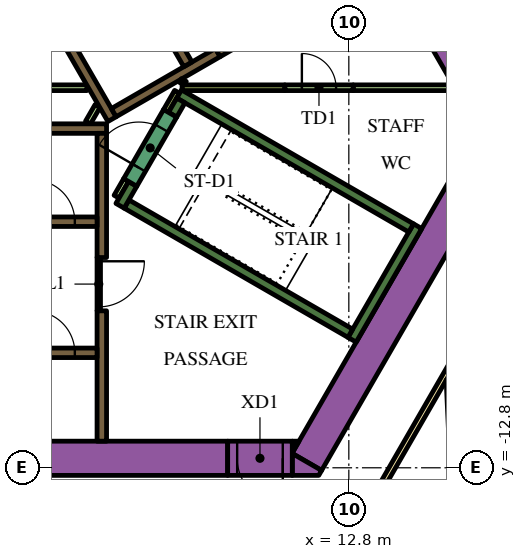
"""IFC4 building model, lengths in metres.
Left out: names, types, materials, properties, quantities, classifications, styles, units other than length and angle.
Written with IfcOpenShell. Run it as: python <this file> out.ifc"""

import sys

from ifc_helpers import new_model, si_unit, direction, frame, frame_2d, origin, place, context, subcontext, project, spatial, polyline, rectangle, outline, extrude, element, fill, save


model = new_model("IFC4")
c1 = context("Model", 3, precision=1e-05, world=origin(), true_north=direction((0.0, 1.0)))
c2 = subcontext(c1, "Body", "Model", "MODEL_VIEW")
j1 = project(units=[si_unit("LENGTHUNIT", "METRE"), si_unit("PLANEANGLEUNIT", "RADIAN")], contexts=[c1])
p1 = place(None, origin())
s1 = spatial("IfcSite", under=j1, at=p1, CompositionType="ELEMENT")
p2 = place(p1, origin())
s2 = spatial("IfcBuilding", under=s1, at=p2, CompositionType="ELEMENT")
p3 = place(p2, frame((0.0, 0.0, 54.9)))
s3 = spatial("IfcBuildingStorey", under=s2, at=p3, CompositionType="ELEMENT", Elevation=54.9)
p4 = place(p3, frame((6.776, 13.364, 0.0), z_axis=(0.0, 0.0, 1.0), x_axis=(0.500004177138, -0.8660229921, 0.0)))
e1 = element("IfcWall", 1, at=p4, inside=s3, PredefinedType="SOLIDWALL", context=c2, shape_type="SweptSolid", body=[
    extrude(rectangle(XDim=20.204, YDim=0.9, at=frame_2d((10.102, 0.0))), origin(), (0.0, 0.0, 1.0), 3.9),
])
p5 = place(p3, frame((11.695, -12.644, 0.0), z_axis=(0.0, 0.0, 1.0), x_axis=(0.500010229568, 0.86601949766, 0.0)))
e2 = element("IfcWall", 2, at=p5, inside=s3, PredefinedType="SOLIDWALL", context=c2, shape_type="SweptSolid", body=[
    extrude(rectangle(XDim=9.326, YDim=0.9, at=frame_2d((4.663, 0.0))), origin(), (0.0, 0.0, 1.0), 3.9),
])
p6 = place(p3, origin())
e3 = element("IfcWall", 3, at=p6, inside=s3, PredefinedType="SOLIDWALL", context=c2, shape_type="SweptSolid", body=[
    extrude(outline(polyline([(12.009, -13.0), (11.312, -13.0), (11.312, -12.425), (12.083, -12.871), (12.009, -13.0)])), origin(), (0.0, 0.0, 1.0), 3.9),
])
e4 = element("IfcWall", 4, at=p6, inside=s3, PredefinedType="SOLIDWALL", context=c2, shape_type="SweptSolid", body=[
    extrude(outline(polyline([(11.489, -12.1), (11.312, -12.407), (11.312, -12.1), (11.489, -12.1)])), origin(), (0.0, 0.0, 1.0), 3.9),
])
p7 = place(p3, frame((-12.019, -12.55, 0.0), z_axis=(0.0, 0.0, 1.0), x_axis=(1.0, 0.0, 0.0)))
e5 = element("IfcWall", 5, at=p7, inside=s3, PredefinedType="SOLIDWALL", context=c2, shape_type="SweptSolid", body=[
    extrude(rectangle(XDim=21.63, YDim=0.9, at=frame_2d((10.815, 0.0))), origin(), (0.0, 0.0, 1.0), 3.9),
])
p8 = place(p3, frame((12.885, -9.431, 0.0), z_axis=(0.0, 0.0, 1.0), x_axis=(0.500020560727, 0.866013532718, 0.0)))
e6 = element("IfcWall", 6, at=p8, inside=s3, PredefinedType="SOLIDWALL", context=c2, shape_type="SweptSolid", body=[
    extrude(rectangle(XDim=3.45, YDim=0.25, at=frame_2d((1.725, 0.0))), origin(), (0.0, 0.0, 1.0), 3.9),
])
p9 = place(p3, frame((12.84, -9.261, 0.0), z_axis=(0.0, 0.0, 1.0), x_axis=(-0.866013990052, 0.500019768644, 0.0)))
e7 = element("IfcWall", 7, at=p9, inside=s3, PredefinedType="SOLIDWALL", context=c2, shape_type="SweptSolid", body=[
    extrude(rectangle(XDim=6.8, YDim=0.25, at=frame_2d((3.4, 0.0))), origin(), (0.0, 0.0, 1.0), 3.9),
])
p10 = place(p3, frame((7.113, -5.33, 0.0), z_axis=(0.0, 0.0, 1.0), x_axis=(-0.499965889992, -0.866045096311, 0.0)))
e8 = element("IfcWall", 8, at=p10, inside=s3, PredefinedType="SOLIDWALL", context=c2, shape_type="SweptSolid", body=[
    extrude(rectangle(XDim=0.666, YDim=0.25, at=frame_2d((0.333, 0.0))), origin(), (0.0, 0.0, 1.0), 3.9),
])
p11 = place(p3, frame((8.334, -2.964, 0.0), z_axis=(0.0, 0.0, 1.0), x_axis=(0.866016039709, -0.500016218704, 0.0)))
e9 = element("IfcWall", 9, at=p11, inside=s3, PredefinedType="SOLIDWALL", context=c2, shape_type="SweptSolid", body=[
    extrude(rectangle(XDim=7.05, YDim=0.25, at=frame_2d((3.525, 0.0))), origin(), (0.0, 0.0, 1.0), 3.9),
])
p12 = place(p3, frame((8.163, -3.511, 0.0), z_axis=(0.0, 0.0, 1.0), x_axis=(0.500127794843, 0.865951608824, 0.0)))
e10 = element("IfcWall", 10, at=p12, inside=s3, PredefinedType="SOLIDWALL", context=c2, shape_type="SweptSolid", body=[
    extrude(rectangle(XDim=0.435, YDim=0.25, at=frame_2d((0.217, 0.0))), origin(), (0.0, 0.0, 1.0), 3.9),
])
p13 = place(p3, frame((-6.19, -3.875, 0.0), z_axis=(0.0, 0.0, 1.0), x_axis=(1.0, 0.0, 0.0)))
e11 = element("IfcWall", 11, at=p13, inside=s3, PredefinedType="SOLIDWALL", context=c2, shape_type="SweptSolid", body=[
    extrude(rectangle(XDim=12.615, YDim=0.25, at=frame_2d((6.307, 0.0))), origin(), (0.0, 0.0, 1.0), 3.9),
])
p14 = place(p3, frame((6.3, -8.67, 0.0), z_axis=(0.0, 0.0, 1.0), x_axis=(0.0, -1.0, 0.0)))
e12 = element("IfcWall", 12, at=p14, inside=s3, PredefinedType="SOLIDWALL", context=c2, shape_type="SweptSolid", body=[
    extrude(rectangle(XDim=3.43, YDim=0.25, at=frame_2d((1.715, 0.0))), origin(), (0.0, 0.0, 1.0), 3.9),
])
p15 = place(p3, frame((6.3, -7.268, 0.0), z_axis=(0.0, 0.0, 1.0), x_axis=(0.0, 1.0, 0.0)))
e13 = element("IfcWall", 13, at=p15, inside=s3, PredefinedType="SOLIDWALL", context=c2, shape_type="SweptSolid", body=[
    extrude(rectangle(XDim=3.268, YDim=0.25, at=frame_2d((1.634, 0.0))), origin(), (0.0, 0.0, 1.0), 3.9),
])
e14 = element("IfcWall", 14, at=p6, inside=s3, PredefinedType="SOLIDWALL", context=c2, shape_type="SweptSolid", body=[
    extrude(outline(polyline([(0.335, 6.925), (0.335, 6.925), (0.335, 7.075), (0.335, 7.075), (0.335, 7.075), (0.245, 7.075), (0.079, 7.363), (0.035, 7.439), (0.252, 7.564), (0.377, 7.348), (6.552, -3.348), (6.677, -3.564), (6.46, -3.689), (4.897, -0.981), (0.332, 6.925), (0.335, 6.925), (0.335, 6.925)])), origin(), (0.0, 0.0, 1.0), 3.9),
])
p16 = place(p3, frame((9.352, -1.875, 0.0), z_axis=(0.0, 0.0, 1.0), x_axis=(-0.866024844342, -0.500000968981, 0.0)))
e15 = element("IfcWall", 15, at=p16, inside=s3, PredefinedType="SOLIDWALL", context=c2, shape_type="SweptSolid", body=[
    extrude(rectangle(XDim=3.162, YDim=0.25, at=frame_2d((1.581, 0.0))), origin(), (0.0, 0.0, 1.0), 3.9),
])
p17 = place(p3, frame((6.688, -5.667, 0.0), z_axis=(0.0, 0.0, 1.0), x_axis=(0.499834152157, 0.86612113491, 0.0)))
e16 = element("IfcWall", 16, at=p17, inside=s3, PredefinedType="PARTITIONING", context=c2, shape_type="SweptSolid", body=[
    extrude(rectangle(XDim=0.505, YDim=0.15, at=frame_2d((0.252, 0.0))), origin(), (0.0, 0.0, 1.0), 2.75),
])
p18 = place(p3, frame((5.936, -3.718, 0.0), z_axis=(0.0, 0.0, 1.0), x_axis=(0.499890179513, 0.866088799389, 0.0)))
e17 = element("IfcWall", 17, at=p18, inside=s3, PredefinedType="PARTITIONING", context=c2, shape_type="SweptSolid", body=[
    extrude(rectangle(XDim=0.504, YDim=0.15, at=frame_2d((0.252, 0.0))), origin(), (0.0, 0.0, 1.0), 2.75),
])
p19 = place(p3, frame((8.412, -2.8, 0.0), z_axis=(0.0, 0.0, 1.0), x_axis=(1.0, 0.0, 0.0)))
e18 = element("IfcWall", 18, at=p19, inside=s3, PredefinedType="PARTITIONING", context=c2, shape_type="SweptSolid", body=[
    extrude(rectangle(XDim=2.702, YDim=0.15, at=frame_2d((1.351, 0.0))), origin(), (0.0, 0.0, 1.0), 3.9),
])
p20 = place(p3, frame((8.459, -2.599, 0.0), z_axis=(0.0, 0.0, 1.0), x_axis=(-0.501919277433, -0.864914469148, 0.0)))
e19 = element("IfcWall", 19, at=p20, inside=s3, PredefinedType="PARTITIONING", context=c2, shape_type="SweptSolid", body=[
    extrude(rectangle(XDim=0.109, YDim=0.15, at=frame_2d((0.054, 0.0))), origin(), (0.0, 0.0, 1.0), 3.9),
])
p21 = place(p3, frame((8.281, -2.907, 0.0), z_axis=(0.0, 0.0, 1.0), x_axis=(-0.500193841991, -0.86591346013, 0.0)))
e20 = element("IfcWall", 20, at=p21, inside=s3, PredefinedType="PARTITIONING", context=c2, shape_type="SweptSolid", body=[
    extrude(rectangle(XDim=0.583, YDim=0.15, at=frame_2d((0.292, 0.0))), origin(), (0.0, 0.0, 1.0), 3.9),
])
p22 = place(p3, frame((3.238, -2.8, 0.0), z_axis=(0.0, 0.0, 1.0), x_axis=(1.0, 0.0, 0.0)))
e21 = element("IfcWall", 21, at=p22, inside=s3, PredefinedType="PARTITIONING", context=c2, shape_type="SweptSolid", body=[
    extrude(rectangle(XDim=2.672, YDim=0.15, at=frame_2d((1.336, 0.0))), origin(), (0.0, 0.0, 1.0), 2.75),
])
p23 = place(p3, frame((12.915, -2.8, 0.0), z_axis=(0.0, 0.0, 1.0), x_axis=(1.0, 0.0, 0.0)))
e22 = element("IfcWall", 22, at=p23, inside=s3, PredefinedType="PARTITIONING", context=c2, shape_type="SweptSolid", body=[
    extrude(rectangle(XDim=2.637, YDim=0.15, at=frame_2d((1.318, 0.0))), origin(), (0.0, 0.0, 1.0), 2.75),
])
p24 = place(p3, frame((-6.175, -9.775, 0.0), z_axis=(0.0, 0.0, 1.0), x_axis=(1.0, 0.0, 0.0)))
e23 = element("IfcWall", 23, at=p24, inside=s3, PredefinedType="SOLIDWALL", context=c2, shape_type="SweptSolid", body=[
    extrude(rectangle(XDim=12.35, YDim=0.25, at=frame_2d((6.175, 0.0))), origin(), (0.0, 0.0, 1.0), 3.9),
])
p25 = place(p24, frame((0.585, 0.0, 0.0)))
e24 = element("IfcOpeningElement", 24, at=p25, cuts=e23, PredefinedType="OPENING", context=c2, shape_type="SweptSolid", body=[
    extrude(rectangle(XDim=1.1, YDim=2.1, at=frame_2d((0.55, 1.05))), frame((0.0, 0.135, 0.0), z_axis=(0.0, -1.0, 0.0), x_axis=(1.0, 0.0, 0.0)), (0.0, 0.0, 1.0), 0.27),
])
p26 = place(p24, frame((3.105, 0.0, 0.0)))
e25 = element("IfcOpeningElement", 25, at=p26, cuts=e23, PredefinedType="OPENING", context=c2, shape_type="SweptSolid", body=[
    extrude(rectangle(XDim=1.1, YDim=2.1, at=frame_2d((0.55, 1.05))), frame((0.0, 0.135, 0.0), z_axis=(0.0, -1.0, 0.0), x_axis=(1.0, 0.0, 0.0)), (0.0, 0.0, 1.0), 0.27),
])
p27 = place(p24, frame((5.625, 0.0, 0.0)))
e26 = element("IfcOpeningElement", 26, at=p27, cuts=e23, PredefinedType="OPENING", context=c2, shape_type="SweptSolid", body=[
    extrude(rectangle(XDim=1.1, YDim=2.1, at=frame_2d((0.55, 1.05))), frame((0.0, 0.135, 0.0), z_axis=(0.0, -1.0, 0.0), x_axis=(1.0, 0.0, 0.0)), (0.0, 0.0, 1.0), 0.27),
])
p28 = place(p24, frame((8.145, 0.0, 0.0)))
e27 = element("IfcOpeningElement", 27, at=p28, cuts=e23, PredefinedType="OPENING", context=c2, shape_type="SweptSolid", body=[
    extrude(rectangle(XDim=1.1, YDim=2.1, at=frame_2d((0.55, 1.05))), frame((0.0, 0.135, 0.0), z_axis=(0.0, -1.0, 0.0), x_axis=(1.0, 0.0, 0.0)), (0.0, 0.0, 1.0), 0.27),
])
p29 = place(p24, frame((10.665, 0.0, 0.0)))
e28 = element("IfcOpeningElement", 28, at=p29, cuts=e23, PredefinedType="OPENING", context=c2, shape_type="SweptSolid", body=[
    extrude(rectangle(XDim=1.1, YDim=2.1, at=frame_2d((0.55, 1.05))), frame((0.0, 0.135, 0.0), z_axis=(0.0, -1.0, 0.0), x_axis=(1.0, 0.0, 0.0)), (0.0, 0.0, 1.0), 0.27),
])
p30 = place(p3, frame((-6.175, -6.325, 0.0), z_axis=(0.0, 0.0, 1.0), x_axis=(1.0, 0.0, 0.0)))
e29 = element("IfcWall", 29, at=p30, inside=s3, PredefinedType="SOLIDWALL", context=c2, shape_type="SweptSolid", body=[
    extrude(rectangle(XDim=12.35, YDim=0.25, at=frame_2d((6.175, 0.0))), origin(), (0.0, 0.0, 1.0), 3.9),
])
p31 = place(p30, frame((3.205, 0.0, 0.0)))
e30 = element("IfcOpeningElement", 30, at=p31, cuts=e29, PredefinedType="OPENING", context=c2, shape_type="SweptSolid", body=[
    extrude(rectangle(XDim=0.9, YDim=2.1, at=frame_2d((0.45, 1.05))), frame((0.0, 0.135, 0.0), z_axis=(0.0, -1.0, 0.0), x_axis=(1.0, 0.0, 0.0)), (0.0, 0.0, 1.0), 0.27),
])
p32 = place(p30, frame((8.145, 0.0, 0.0)))
e31 = element("IfcOpeningElement", 31, at=p32, cuts=e29, PredefinedType="OPENING", context=c2, shape_type="SweptSolid", body=[
    extrude(rectangle(XDim=1.1, YDim=2.1, at=frame_2d((0.55, 1.05))), frame((0.0, 0.135, 0.0), z_axis=(0.0, -1.0, 0.0), x_axis=(1.0, 0.0, 0.0)), (0.0, 0.0, 1.0), 0.27),
])
p33 = place(p30, frame((10.665, 0.0, 0.0)))
e32 = element("IfcOpeningElement", 32, at=p33, cuts=e29, PredefinedType="OPENING", context=c2, shape_type="SweptSolid", body=[
    extrude(rectangle(XDim=1.1, YDim=2.1, at=frame_2d((0.55, 1.05))), frame((0.0, 0.135, 0.0), z_axis=(0.0, -1.0, 0.0), x_axis=(1.0, 0.0, 0.0)), (0.0, 0.0, 1.0), 0.27),
])
p34 = place(p3, frame((8.565, -2.185, 0.0), z_axis=(0.0, 0.0, 1.0), x_axis=(-0.499997954832, 0.866026584559, 0.0)))
e33 = element("IfcWall", 33, at=p34, inside=s3, PredefinedType="SOLIDWALL", context=c2, shape_type="SweptSolid", body=[
    extrude(rectangle(XDim=12.35, YDim=0.25, at=frame_2d((6.175, 0.0))), origin(), (0.0, 0.0, 1.0), 3.9),
])
p35 = place(p34, frame((5.725, 0.0, 0.0)))
e34 = element("IfcOpeningElement", 34, at=p35, cuts=e33, PredefinedType="OPENING", context=c2, shape_type="SweptSolid", body=[
    extrude(rectangle(XDim=0.9, YDim=2.1, at=frame_2d((0.45, 1.05))), frame((0.0, 0.135, 0.0), z_axis=(0.0, -1.0, 0.0), x_axis=(1.0, 0.0, 0.0)), (0.0, 0.0, 1.0), 0.27),
])
p36 = place(p3, frame((7.048, -5.292, 0.0), z_axis=(0.0, 0.0, 1.0), x_axis=(0.49994051562, 0.866059744384, 0.0)))
e35 = element("IfcWall", 35, at=p36, inside=s3, PredefinedType="SOLIDWALL", context=c2, shape_type="SweptSolid", body=[
    extrude(rectangle(XDim=2.1, YDim=0.4, at=frame_2d((1.05, 0.0))), origin(), (0.0, 0.0, 1.0), 3.9),
])
p37 = place(p36, frame((0.45, 0.0, 0.0)))
e36 = element("IfcOpeningElement", 36, at=p37, cuts=e35, PredefinedType="OPENING", context=c2, shape_type="SweptSolid", body=[
    extrude(rectangle(XDim=1.2, YDim=2.1, at=frame_2d((0.6, 1.05))), frame((0.0, 0.21, 0.0), z_axis=(0.0, -1.0, 0.0), x_axis=(1.0, 0.0, 0.0)), (0.0, 0.0, 1.0), 0.42),
])
p38 = place(p3, frame((6.22, -7.266, 0.0), z_axis=(0.0, 0.0, 1.0), x_axis=(0.0, -1.0, 0.0)))
e37 = element("IfcWall", 37, at=p38, inside=s3, PredefinedType="PARTITIONING", context=c2, shape_type="SweptSolid", body=[
    extrude(rectangle(XDim=1.4, YDim=0.09, at=frame_2d((0.7, 0.0))), origin(), (0.0, 0.0, 1.0), 2.75),
])
p39 = place(p38, frame((0.1, 0.0, 0.0)))
e38 = element("IfcOpeningElement", 38, at=p39, cuts=e37, PredefinedType="OPENING", context=c2, shape_type="SweptSolid", body=[
    extrude(rectangle(XDim=1.2, YDim=2.1, at=frame_2d((0.6, 1.05))), frame((0.0, 0.055, 0.0), z_axis=(0.0, -1.0, 0.0), x_axis=(1.0, 0.0, 0.0)), (0.0, 0.0, 1.0), 0.11),
])
p40 = place(p3, frame((11.312, -12.55, 0.0), z_axis=(0.0, 0.0, 1.0), x_axis=(-1.0, 0.0, 0.0)))
e39 = element("IfcWall", 39, at=p40, inside=s3, PredefinedType="SOLIDWALL", context=c2, shape_type="SweptSolid", body=[
    extrude(rectangle(XDim=1.7, YDim=0.9, at=frame_2d((0.85, 0.0))), origin(), (0.0, 0.0, 1.0), 3.9),
])
p41 = place(p40, frame((0.25, 0.0, 0.0)))
e40 = element("IfcOpeningElement", 40, at=p41, cuts=e39, PredefinedType="OPENING", context=c2, shape_type="SweptSolid", body=[
    extrude(rectangle(XDim=1.2, YDim=2.1, at=frame_2d((0.6, 1.05))), frame((0.0, 0.46, 0.0), z_axis=(0.0, -1.0, 0.0), x_axis=(1.0, 0.0, 0.0)), (0.0, 0.0, 1.0), 0.92),
])
p42 = place(p3, frame((9.352, -1.875, 0.0), z_axis=(0.0, 0.0, 1.0), x_axis=(0.865989075817, 0.500062916607, 0.0)))
e41 = element("IfcWall", 41, at=p42, inside=s3, PredefinedType="SOLIDWALL", context=c2, shape_type="SweptSolid", body=[
    extrude(rectangle(XDim=1.8, YDim=0.25, at=frame_2d((0.9, 0.0))), origin(), (0.0, 0.0, 1.0), 3.9),
])
p43 = place(p42, frame((0.45, 0.0, 0.0)))
e42 = element("IfcOpeningElement", 42, at=p43, cuts=e41, PredefinedType="OPENING", context=c2, shape_type="SweptSolid", body=[
    extrude(rectangle(XDim=0.9, YDim=2.1, at=frame_2d((0.45, 1.05))), frame((0.0, 0.135, 0.0), z_axis=(0.0, -1.0, 0.0), x_axis=(1.0, 0.0, 0.0)), (0.0, 0.0, 1.0), 0.27),
])
p44 = place(p3, frame((11.115, -2.8, 0.0), z_axis=(0.0, 0.0, 1.0), x_axis=(1.0, 0.0, 0.0)))
e43 = element("IfcWall", 43, at=p44, inside=s3, PredefinedType="PARTITIONING", context=c2, shape_type="SweptSolid", body=[
    extrude(rectangle(XDim=1.8, YDim=0.15, at=frame_2d((0.9, 0.0))), origin(), (0.0, 0.0, 1.0), 2.75),
])
p45 = place(p44, frame((0.45, 0.0, 0.0)))
e44 = element("IfcOpeningElement", 44, at=p45, cuts=e43, PredefinedType="OPENING", context=c2, shape_type="SweptSolid", body=[
    extrude(rectangle(XDim=0.9, YDim=2.1, at=frame_2d((0.45, 1.05))), frame((0.0, 0.085, 0.0), z_axis=(0.0, -1.0, 0.0), x_axis=(1.0, 0.0, 0.0)), (0.0, 0.0, 1.0), 0.17),
])
p46 = place(p3, frame((6.163, 18.475, 0.0), z_axis=(0.0, 0.0, 1.0), x_axis=(0.500001317485, -0.866024643133, 0.0)))
e45 = element("IfcWall", 45, at=p46, inside=s3, PredefinedType="PARTITIONING", context=c2, shape_type="SweptSolid", body=[
    extrude(rectangle(XDim=25.767, YDim=0.15, at=frame_2d((12.883, 0.0))), origin(), (0.0, 0.0, 1.0), 2.75),
])
p47 = place(p46, frame((24.586, 0.0, 0.0)))
e46 = element("IfcOpeningElement", 46, at=p47, cuts=e45, PredefinedType="OPENING", context=c2, shape_type="SweptSolid", body=[
    extrude(rectangle(XDim=1.0, YDim=2.1, at=frame_2d((0.5, 1.05))), frame((0.0, 0.085, 0.0), z_axis=(0.0, -1.0, 0.0), x_axis=(1.0, 0.0, 0.0)), (0.0, 0.0, 1.0), 0.17),
])
p48 = place(p46, frame((13.144, 0.0, 0.0)))
e47 = element("IfcOpeningElement", 47, at=p48, cuts=e45, PredefinedType="OPENING", context=c2, shape_type="SweptSolid", body=[
    extrude(rectangle(XDim=1.0, YDim=2.1, at=frame_2d((0.5, 1.05))), frame((0.0, 0.085, 0.0), z_axis=(0.0, -1.0, 0.0), x_axis=(1.0, 0.0, 0.0)), (0.0, 0.0, 1.0), 0.17),
])
p49 = place(p46, frame((11.692, 0.0, 0.0)))
e48 = element("IfcOpeningElement", 48, at=p49, cuts=e45, PredefinedType="OPENING", context=c2, shape_type="SweptSolid", body=[
    extrude(rectangle(XDim=1.0, YDim=2.1, at=frame_2d((0.5, 1.05))), frame((0.0, 0.085, 0.0), z_axis=(0.0, -1.0, 0.0), x_axis=(1.0, 0.0, 0.0)), (0.0, 0.0, 1.0), 0.17),
])
p50 = place(p46, frame((0.572, 0.0, 0.0)))
e49 = element("IfcOpeningElement", 49, at=p50, cuts=e45, PredefinedType="OPENING", context=c2, shape_type="SweptSolid", body=[
    extrude(rectangle(XDim=1.0, YDim=2.1, at=frame_2d((0.5, 1.05))), frame((0.0, 0.085, 0.0), z_axis=(0.0, -1.0, 0.0), x_axis=(1.0, 0.0, 0.0)), (0.0, 0.0, 1.0), 0.17),
])
p51 = place(p3, frame((15.587, -9.952, 0.0), z_axis=(0.0, 0.0, 1.0), x_axis=(-0.500016618951, -0.866015808616, 0.0)))
e50 = element("IfcWall", 50, at=p51, inside=s3, PredefinedType="PARTITIONING", context=c2, shape_type="SweptSolid", body=[
    extrude(rectangle(XDim=5.268, YDim=0.15, at=frame_2d((2.634, 0.0))), origin(), (0.0, 0.0, 1.0), 2.75),
])
p52 = place(p3, frame((15.973, -22.109, 0.0), z_axis=(0.0, 0.0, 1.0), x_axis=(-0.046191717129, 0.998932592955, 0.0)))
e51 = element("IfcWall", 51, at=p52, inside=s3, PredefinedType="PARTITIONING", context=c2, shape_type="SweptSolid", body=[
    extrude(rectangle(XDim=11.638, YDim=0.15, at=frame_2d((5.819, 0.0))), origin(), (0.0, 0.0, 1.0), 2.75),
])
p53 = place(p29, origin())
e52 = element("IfcDoor", 52, at=p53, inside=s3, OperationType="DOUBLE_DOOR_SLIDING", PredefinedType="DOOR", context=c2, shape_type="SweptSolid", body=[
    extrude(rectangle(XDim=1.1, YDim=2.1, at=frame_2d((0.55, 1.05))), frame((0.0, 0.025, 0.0), z_axis=(0.0, -1.0, 0.0), x_axis=(1.0, 0.0, 0.0)), (0.0, 0.0, 1.0), 0.05),
])
fill(e28, e52)
p54 = place(p33, origin())
e53 = element("IfcDoor", 53, at=p54, inside=s3, OperationType="DOUBLE_DOOR_SLIDING", PredefinedType="DOOR", context=c2, shape_type="SweptSolid", body=[
    extrude(rectangle(XDim=1.1, YDim=2.1, at=frame_2d((0.55, 1.05))), frame((0.0, 0.025, 0.0), z_axis=(0.0, -1.0, 0.0), x_axis=(1.0, 0.0, 0.0)), (0.0, 0.0, 1.0), 0.05),
])
fill(e32, e53)
p55 = place(p37, origin())
e54 = element("IfcDoor", 54, at=p55, inside=s3, OperationType="SINGLE_SWING_LEFT", PredefinedType="DOOR", context=c2, shape_type="SweptSolid", body=[
    extrude(rectangle(XDim=1.2, YDim=2.1, at=frame_2d((0.6, 1.05))), frame((0.0, 0.025, 0.0), z_axis=(0.0, -1.0, 0.0), x_axis=(1.0, 0.0, 0.0)), (0.0, 0.0, 1.0), 0.05),
])
fill(e36, e54)
p56 = place(p39, origin())
e55 = element("IfcDoor", 55, at=p56, inside=s3, OperationType="SINGLE_SWING_LEFT", PredefinedType="DOOR", context=c2, shape_type="SweptSolid", body=[
    extrude(rectangle(XDim=1.2, YDim=2.1, at=frame_2d((0.6, 1.05))), frame((0.0, 0.025, 0.0), z_axis=(0.0, -1.0, 0.0), x_axis=(1.0, 0.0, 0.0)), (0.0, 0.0, 1.0), 0.05),
])
fill(e38, e55)
p57 = place(p41, origin())
e56 = element("IfcDoor", 56, at=p57, inside=s3, OperationType="SINGLE_SWING_LEFT", PredefinedType="DOOR", context=c2, shape_type="SweptSolid", body=[
    extrude(rectangle(XDim=1.2, YDim=2.1, at=frame_2d((0.6, 1.05))), frame((0.0, 0.025, 0.0), z_axis=(0.0, -1.0, 0.0), x_axis=(1.0, 0.0, 0.0)), (0.0, 0.0, 1.0), 0.05),
])
fill(e40, e56)
p58 = place(p45, origin())
e57 = element("IfcDoor", 57, at=p58, inside=s3, OperationType="SINGLE_SWING_LEFT", PredefinedType="DOOR", context=c2, shape_type="SweptSolid", body=[
    extrude(rectangle(XDim=0.9, YDim=2.1, at=frame_2d((0.45, 1.05))), frame((0.0, 0.025, 0.0), z_axis=(0.0, -1.0, 0.0), x_axis=(1.0, 0.0, 0.0)), (0.0, 0.0, 1.0), 0.05),
])
fill(e44, e57)
save(model, sys.argv[1])
